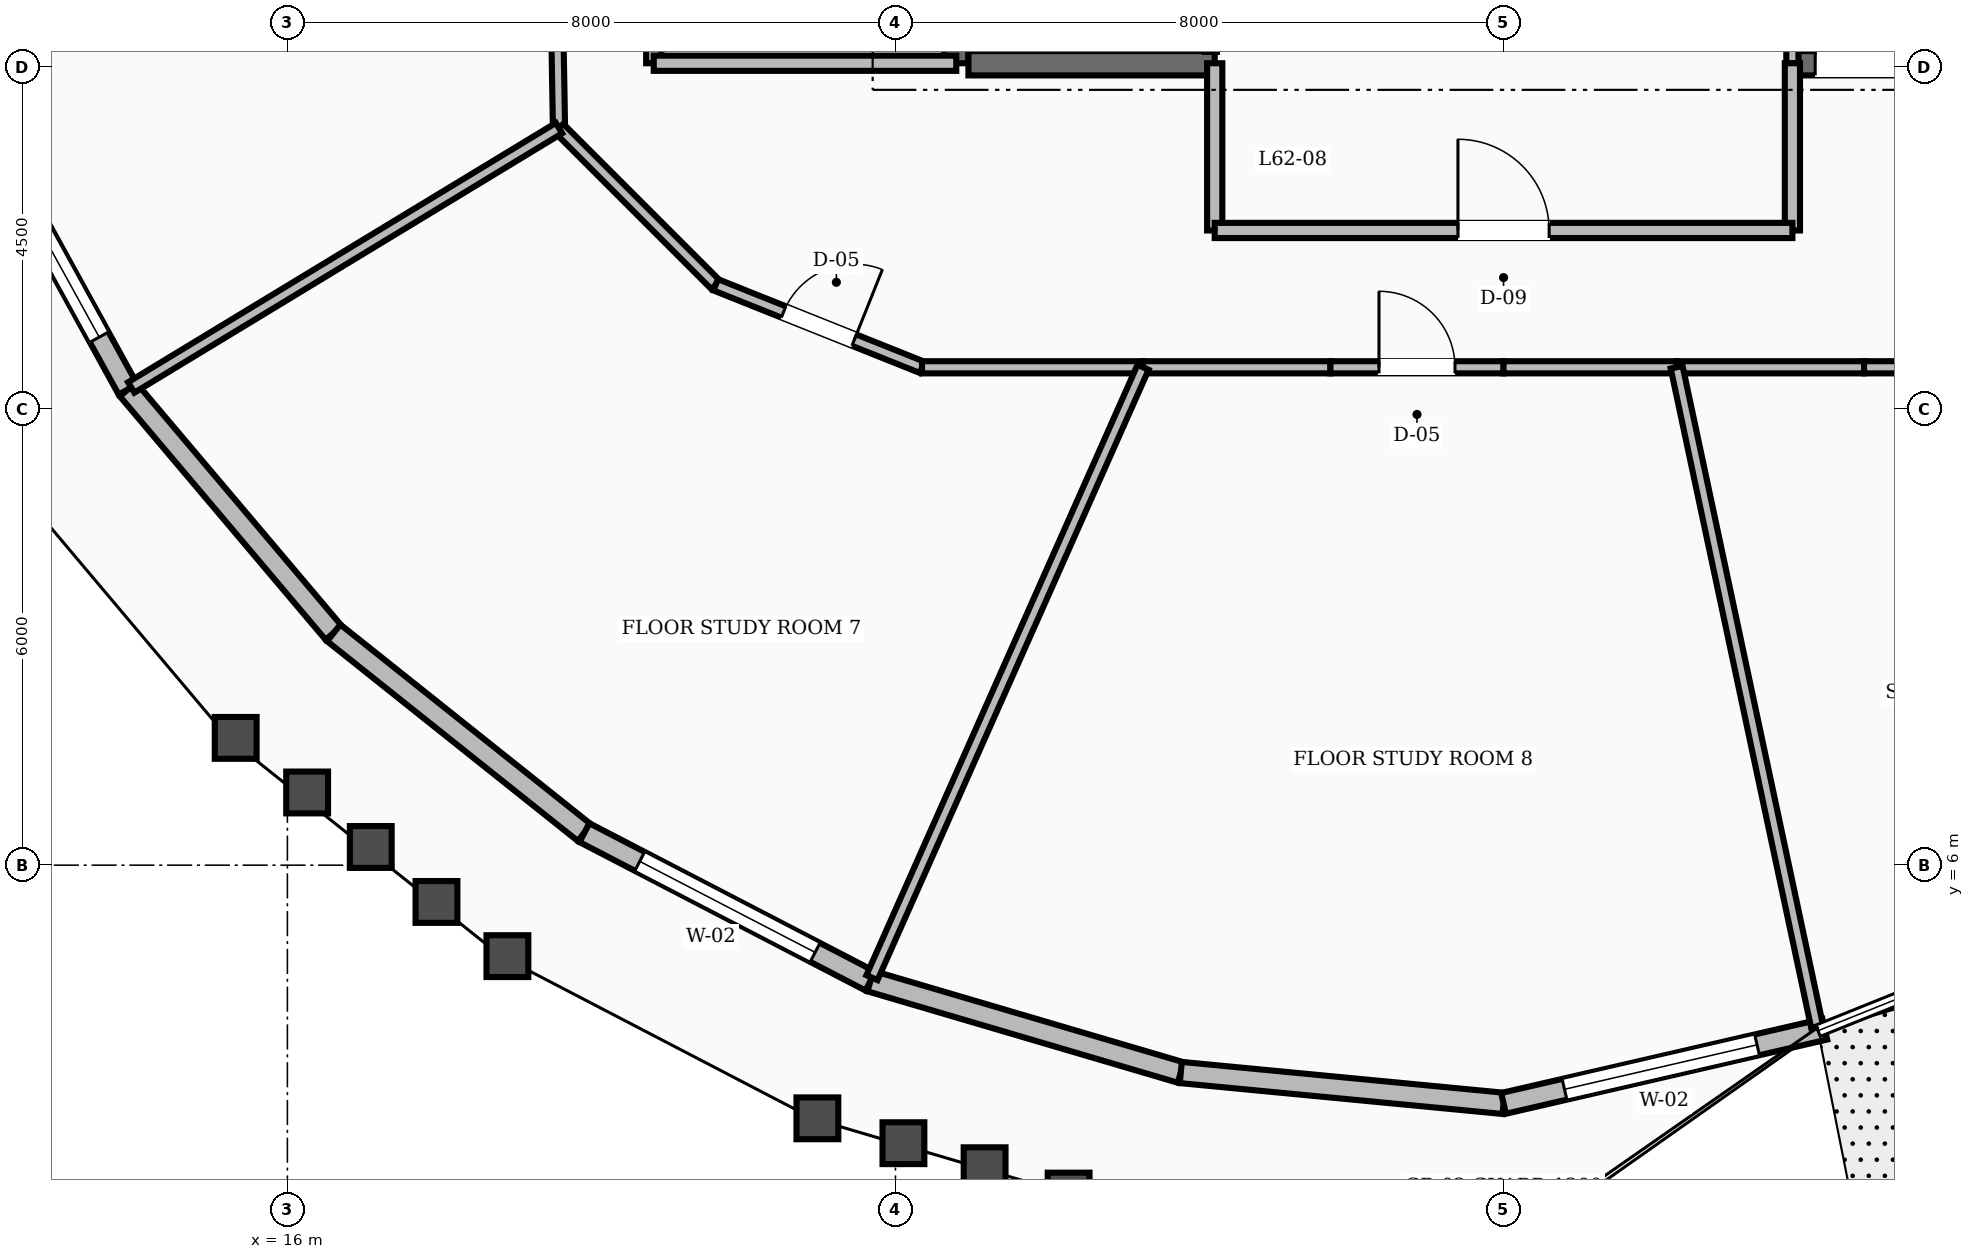
"""IFC4 building model, lengths in metres.
Left out: names, types, materials, properties, quantities, classifications, styles, units other than length and angle.
Written with IfcOpenShell. Run it as: python <this file> out.ifc"""

import sys

from ifc_helpers import new_model, si_unit, direction, frame, frame_2d, origin, place, context, subcontext, project, spatial, rectangle, extrude, element, fill, save


model = new_model("IFC4")
c1 = context("Model", 3, precision=1e-05, world=origin(), true_north=direction((0.0, 1.0)))
c2 = subcontext(c1, "Body", "Model", "MODEL_VIEW")
j1 = project(units=[si_unit("LENGTHUNIT", "METRE"), si_unit("PLANEANGLEUNIT", "RADIAN")], contexts=[c1])
p1 = place(None, origin())
s1 = spatial("IfcSite", under=j1, at=p1, CompositionType="ELEMENT")
p2 = place(p1, origin())
s2 = spatial("IfcBuilding", under=s1, at=p2, CompositionType="ELEMENT")
p3 = place(p2, frame((0.0, 0.0, 240.0)))
s3 = spatial("IfcBuildingStorey", under=s2, at=p3, CompositionType="ELEMENT", Elevation=240.0)
p4 = place(p3, frame((24.8, 16.55, 0.0), z_axis=(0.0, 0.0, 1.0), x_axis=(0.0, 1.0, 0.0)))
e1 = element("IfcWall", 1, at=p4, inside=s3, PredefinedType="SHEAR", context=c2, shape_type="SweptSolid", body=[
    extrude(rectangle(XDim=6.3, YDim=0.32, at=frame_2d((3.15, 0.0))), origin(), (0.0, 0.0, 1.0), 3.6),
])
p5 = place(p3, frame((24.96, 16.55, 0.0), z_axis=(0.0, 0.0, 1.0), x_axis=(1.0, 0.0, 0.0)))
e2 = element("IfcWall", 2, at=p5, inside=s3, PredefinedType="SHEAR", context=c2, shape_type="SweptSolid", body=[
    extrude(rectangle(XDim=3.24, YDim=0.32, at=frame_2d((1.62, 0.0))), origin(), (0.0, 0.0, 1.0), 3.6),
])
p6 = place(p3, frame((35.8, 16.55, 0.0), z_axis=(0.0, 0.0, 1.0), x_axis=(1.0, 0.0, 0.0)))
e3 = element("IfcWall", 3, at=p6, inside=s3, PredefinedType="SHEAR", context=c2, shape_type="SweptSolid", body=[
    extrude(rectangle(XDim=3.24, YDim=0.32, at=frame_2d((1.62, 0.0))), origin(), (0.0, 0.0, 1.0), 3.6),
])
p7 = place(p6, frame((0.3, 0.0, 0.0)))
e4 = element("IfcOpeningElement", 4, at=p7, cuts=e3, PredefinedType="OPENING", context=c2, shape_type="SweptSolid", body=[
    extrude(rectangle(XDim=1.1, YDim=2.1, at=frame_2d((0.55, 1.05))), frame((0.0, 0.17, 0.0), z_axis=(0.0, -1.0, 0.0), x_axis=(1.0, 0.0, 0.0)), (0.0, 0.0, 1.0), 0.34),
])
p8 = place(p3, frame((11.891, 15.912, 0.0), z_axis=(0.0, 0.0, 1.0), x_axis=(0.482219827967, -0.876050248282, 0.0)))
e5 = element("IfcWall", 5, at=p8, inside=s3, PredefinedType="STANDARD", context=c2, shape_type="SweptSolid", body=[
    extrude(rectangle(XDim=4.171, YDim=0.28, at=frame_2d((2.085, 0.0))), origin(), (0.0, 0.0, 1.0), 2.88),
])
p9 = place(p8, frame((0.785, 0.0, 0.8)))
e6 = element("IfcOpeningElement", 6, at=p9, cuts=e5, PredefinedType="OPENING", context=c2, shape_type="SweptSolid", body=[
    extrude(rectangle(XDim=2.6, YDim=1.65, at=frame_2d((1.3, 0.825))), frame((0.0, 0.15, 0.0), z_axis=(0.0, -1.0, 0.0), x_axis=(1.0, 0.0, 0.0)), (0.0, 0.0, 1.0), 0.3),
])
p10 = place(p3, frame((13.903, 12.259, 0.0), z_axis=(0.0, 0.0, 1.0), x_axis=(0.645568939202, -0.763701999956, 0.0)))
e7 = element("IfcWall", 7, at=p10, inside=s3, PredefinedType="STANDARD", context=c2, shape_type="SweptSolid", body=[
    extrude(rectangle(XDim=4.193, YDim=0.28, at=frame_2d((2.097, 0.0))), origin(), (0.0, 0.0, 1.0), 2.88),
])
p11 = place(p3, frame((16.61, 9.056, 0.0), z_axis=(0.0, 0.0, 1.0), x_axis=(0.782030895384, -0.623239663906, 0.0)))
e8 = element("IfcWall", 8, at=p11, inside=s3, PredefinedType="STANDARD", context=c2, shape_type="SweptSolid", body=[
    extrude(rectangle(XDim=4.217, YDim=0.28, at=frame_2d((2.109, 0.0))), origin(), (0.0, 0.0, 1.0), 2.88),
])
p12 = place(p3, frame((19.908, 6.428, 0.0), z_axis=(0.0, 0.0, 1.0), x_axis=(0.887588000353, -0.460638189504, 0.0)))
e9 = element("IfcWall", 9, at=p12, inside=s3, PredefinedType="STANDARD", context=c2, shape_type="SweptSolid", body=[
    extrude(rectangle(XDim=4.24, YDim=0.28, at=frame_2d((2.12, 0.0))), origin(), (0.0, 0.0, 1.0), 2.88),
])
p13 = place(p12, frame((0.82, 0.0, 0.8)))
e10 = element("IfcOpeningElement", 10, at=p13, cuts=e9, PredefinedType="OPENING", context=c2, shape_type="SweptSolid", body=[
    extrude(rectangle(XDim=2.6, YDim=1.65, at=frame_2d((1.3, 0.825))), frame((0.0, 0.15, 0.0), z_axis=(0.0, -1.0, 0.0), x_axis=(1.0, 0.0, 0.0)), (0.0, 0.0, 1.0), 0.3),
])
p14 = place(p3, frame((23.671, 4.475, 0.0), z_axis=(0.0, 0.0, 1.0), x_axis=(0.95925857755, -0.28252961154, 0.0)))
e11 = element("IfcWall", 11, at=p14, inside=s3, PredefinedType="STANDARD", context=c2, shape_type="SweptSolid", body=[
    extrude(rectangle(XDim=4.257, YDim=0.28, at=frame_2d((2.128, 0.0))), origin(), (0.0, 0.0, 1.0), 2.88),
])
p15 = place(p3, frame((27.754, 3.272, 0.0), z_axis=(0.0, 0.0, 1.0), x_axis=(0.995459644973, -0.09518453252, 0.0)))
e12 = element("IfcWall", 12, at=p15, inside=s3, PredefinedType="STANDARD", context=c2, shape_type="SweptSolid", body=[
    extrude(rectangle(XDim=4.265, YDim=0.28, at=frame_2d((2.133, 0.0))), origin(), (0.0, 0.0, 1.0), 2.88),
])
p16 = place(p3, frame((32.0, 2.866, 0.0), z_axis=(0.0, 0.0, 1.0), x_axis=(0.974367475621, 0.22496226895, 0.0)))
e13 = element("IfcWall", 13, at=p16, inside=s3, PredefinedType="STANDARD", context=c2, shape_type="SweptSolid", body=[
    extrude(rectangle(XDim=4.338, YDim=0.28, at=frame_2d((2.169, 0.0))), origin(), (0.0, 0.0, 1.0), 2.88),
])
p17 = place(p16, frame((0.823, 0.0, 0.8)))
e14 = element("IfcOpeningElement", 14, at=p17, cuts=e13, PredefinedType="OPENING", context=c2, shape_type="SweptSolid", body=[
    extrude(rectangle(XDim=2.6, YDim=1.65, at=frame_2d((1.3, 0.825))), frame((0.0, 0.15, 0.0), z_axis=(0.0, -1.0, 0.0), x_axis=(1.0, 0.0, 0.0)), (0.0, 0.0, 1.0), 0.3),
])
p18 = place(p3, frame((20.82, 16.55, 0.0), z_axis=(0.0, 0.0, 1.0), x_axis=(0.0, 1.0, 0.0)))
e15 = element("IfcWall", 15, at=p18, inside=s3, PredefinedType="SOLIDWALL", context=c2, shape_type="SweptSolid", body=[
    extrude(rectangle(XDim=2.73, YDim=0.2, at=frame_2d((1.365, 0.0))), origin(), (0.0, 0.0, 1.0), 2.87),
])
p19 = place(p18, frame((0.815, 0.0, 0.0)))
e16 = element("IfcOpeningElement", 16, at=p19, cuts=e15, PredefinedType="OPENING", context=c2, shape_type="SweptSolid", body=[
    extrude(rectangle(XDim=1.1, YDim=2.1, at=frame_2d((0.55, 1.05))), frame((0.0, 0.11, 0.0), z_axis=(0.0, -1.0, 0.0), x_axis=(1.0, 0.0, 0.0)), (0.0, 0.0, 1.0), 0.22),
])
p20 = place(p3, frame((20.82, 16.55, 0.0), z_axis=(0.0, 0.0, 1.0), x_axis=(1.0, 0.0, 0.0)))
e17 = element("IfcWall", 17, at=p20, inside=s3, PredefinedType="SOLIDWALL", context=c2, shape_type="SweptSolid", body=[
    extrude(rectangle(XDim=3.98, YDim=0.2, at=frame_2d((1.99, 0.0))), origin(), (0.0, 0.0, 1.0), 2.87),
])
p21 = place(p3, frame((35.8, 16.55, 0.0), z_axis=(0.0, 0.0, 1.0), x_axis=(0.0, 1.0, 0.0)))
e18 = element("IfcWall", 18, at=p21, inside=s3, PredefinedType="SOLIDWALL", context=c2, shape_type="SweptSolid", body=[
    extrude(rectangle(XDim=3.3, YDim=0.16, at=frame_2d((1.65, 0.0))), origin(), (0.0, 0.0, 1.0), 2.87),
])
for number, where, z_axis, x_axis in (
    (19, (28.2, 14.35, 0.0), (0.0, 0.0, 1.0), (0.0, 1.0, 0.0)),
    (20, (35.8, 14.35, 0.0), (0.0, 0.0, 1.0), (0.0, 1.0, 0.0)),
):
    element("IfcWall", number, at=place(p3, frame(where, z_axis=z_axis, x_axis=x_axis)), inside=s3, PredefinedType="SOLIDWALL", context=c2, shape_type="SweptSolid", body=[
        extrude(rectangle(XDim=2.2, YDim=0.2, at=frame_2d((1.1, 0.0))), origin(), (0.0, 0.0, 1.0), 2.87),
    ])
p22 = place(p3, frame((28.2, 14.35, 0.0), z_axis=(0.0, 0.0, 1.0), x_axis=(1.0, 0.0, 0.0)))
e21 = element("IfcWall", 21, at=p22, inside=s3, PredefinedType="SOLIDWALL", context=c2, shape_type="SweptSolid", body=[
    extrude(rectangle(XDim=7.6, YDim=0.2, at=frame_2d((3.8, 0.0))), origin(), (0.0, 0.0, 1.0), 2.87),
])
p23 = place(p22, frame((3.2, 0.0, 0.0)))
e22 = element("IfcOpeningElement", 22, at=p23, cuts=e21, PredefinedType="OPENING", context=c2, shape_type="SweptSolid", body=[
    extrude(rectangle(XDim=1.2, YDim=2.1, at=frame_2d((0.6, 1.05))), frame((0.0, 0.11, 0.0), z_axis=(0.0, -1.0, 0.0), x_axis=(1.0, 0.0, 0.0)), (0.0, 0.0, 1.0), 0.22),
])
p24 = place(p3, frame((19.52, 18.831, 0.0), z_axis=(0.0, 0.0, 1.0), x_axis=(0.016981035134, -0.999855811828, 0.0)))
e23 = element("IfcWall", 23, at=p24, inside=s3, PredefinedType="SOLIDWALL", context=c2, shape_type="SweptSolid", body=[
    extrude(rectangle(XDim=3.134, YDim=0.16, at=frame_2d((1.567, 0.0))), origin(), (0.0, 0.0, 1.0), 2.87),
])
p25 = place(p3, frame((19.573, 15.697, 0.0), z_axis=(0.0, 0.0, 1.0), x_axis=(0.707106781187, -0.707106781187, 0.0)))
e24 = element("IfcWall", 24, at=p25, inside=s3, PredefinedType="SOLIDWALL", context=c2, shape_type="SweptSolid", body=[
    extrude(rectangle(XDim=2.916, YDim=0.16, at=frame_2d((1.458, 0.0))), origin(), (0.0, 0.0, 1.0), 2.87),
])
p26 = place(p3, frame((21.635, 13.635, 0.0), z_axis=(0.0, 0.0, 1.0), x_axis=(0.92856882165, -0.371160266542, 0.0)))
e25 = element("IfcWall", 25, at=p26, inside=s3, PredefinedType="SOLIDWALL", context=c2, shape_type="SweptSolid", body=[
    extrude(rectangle(XDim=2.923, YDim=0.16, at=frame_2d((1.461, 0.0))), origin(), (0.0, 0.0, 1.0), 2.87),
])
p27 = place(p26, frame((0.962, 0.0, 0.0)))
e26 = element("IfcOpeningElement", 26, at=p27, cuts=e25, PredefinedType="OPENING", context=c2, shape_type="SweptSolid", body=[
    extrude(rectangle(XDim=1.0, YDim=2.1, at=frame_2d((0.5, 1.05))), frame((0.0, 0.09, 0.0), z_axis=(0.0, -1.0, 0.0), x_axis=(1.0, 0.0, 0.0)), (0.0, 0.0, 1.0), 0.18),
])
p28 = place(p3, frame((24.349, 12.55, 0.0), z_axis=(0.0, 0.0, 1.0), x_axis=(1.0, 0.0, 0.0)))
e27 = element("IfcWall", 27, at=p28, inside=s3, PredefinedType="SOLIDWALL", context=c2, shape_type="SweptSolid", body=[
    extrude(rectangle(XDim=2.908, YDim=0.16, at=frame_2d((1.454, 0.0))), origin(), (0.0, 0.0, 1.0), 2.87),
])
p29 = place(p3, frame((27.257, 12.55, 0.0), z_axis=(0.0, 0.0, 1.0), x_axis=(1.0, 0.0, 0.0)))
e28 = element("IfcWall", 28, at=p29, inside=s3, PredefinedType="SOLIDWALL", context=c2, shape_type="SweptSolid", body=[
    extrude(rectangle(XDim=2.465, YDim=0.16, at=frame_2d((1.232, 0.0))), origin(), (0.0, 0.0, 1.0), 2.87),
])
p30 = place(p3, frame((29.722, 12.55, 0.0), z_axis=(0.0, 0.0, 1.0), x_axis=(1.0, 0.0, 0.0)))
e29 = element("IfcWall", 29, at=p30, inside=s3, PredefinedType="SOLIDWALL", context=c2, shape_type="SweptSolid", body=[
    extrude(rectangle(XDim=2.278, YDim=0.16, at=frame_2d((1.139, 0.0))), origin(), (0.0, 0.0, 1.0), 2.87),
])
p31 = place(p30, frame((0.639, 0.0, 0.0)))
e30 = element("IfcOpeningElement", 30, at=p31, cuts=e29, PredefinedType="OPENING", context=c2, shape_type="SweptSolid", body=[
    extrude(rectangle(XDim=1.0, YDim=2.1, at=frame_2d((0.5, 1.05))), frame((0.0, 0.09, 0.0), z_axis=(0.0, -1.0, 0.0), x_axis=(1.0, 0.0, 0.0)), (0.0, 0.0, 1.0), 0.18),
])
p32 = place(p3, frame((32.0, 12.55, 0.0), z_axis=(0.0, 0.0, 1.0), x_axis=(1.0, 0.0, 0.0)))
e31 = element("IfcWall", 31, at=p32, inside=s3, PredefinedType="SOLIDWALL", context=c2, shape_type="SweptSolid", body=[
    extrude(rectangle(XDim=2.278, YDim=0.16, at=frame_2d((1.139, 0.0))), origin(), (0.0, 0.0, 1.0), 2.87),
])
p33 = place(p3, frame((34.278, 12.55, 0.0), z_axis=(0.0, 0.0, 1.0), x_axis=(1.0, 0.0, 0.0)))
e32 = element("IfcWall", 32, at=p33, inside=s3, PredefinedType="SOLIDWALL", context=c2, shape_type="SweptSolid", body=[
    extrude(rectangle(XDim=2.465, YDim=0.16, at=frame_2d((1.232, 0.0))), origin(), (0.0, 0.0, 1.0), 2.87),
])
p34 = place(p3, frame((36.743, 12.55, 0.0), z_axis=(0.0, 0.0, 1.0), x_axis=(1.0, 0.0, 0.0)))
e33 = element("IfcWall", 33, at=p34, inside=s3, PredefinedType="SOLIDWALL", context=c2, shape_type="SweptSolid", body=[
    extrude(rectangle(XDim=2.908, YDim=0.16, at=frame_2d((1.454, 0.0))), origin(), (0.0, 0.0, 1.0), 2.87),
])
p35 = place(p34, frame((0.954, 0.0, 0.0)))
e34 = element("IfcOpeningElement", 34, at=p35, cuts=e33, PredefinedType="OPENING", context=c2, shape_type="SweptSolid", body=[
    extrude(rectangle(XDim=1.0, YDim=2.1, at=frame_2d((0.5, 1.05))), frame((0.0, 0.09, 0.0), z_axis=(0.0, -1.0, 0.0), x_axis=(1.0, 0.0, 0.0)), (0.0, 0.0, 1.0), 0.18),
])
p36 = place(p3, frame((19.573, 15.697, 0.0), z_axis=(0.0, 0.0, 1.0), x_axis=(-0.855087696753, -0.518483394973, 0.0)))
e35 = element("IfcWall", 35, at=p36, inside=s3, PredefinedType="SOLIDWALL", context=c2, shape_type="SweptSolid", body=[
    extrude(rectangle(XDim=6.581, YDim=0.16, at=frame_2d((3.291, 0.0))), origin(), (0.0, 0.0, 1.0), 2.87),
])
p37 = place(p3, frame((27.257, 12.55, 0.0), z_axis=(0.0, 0.0, 1.0), x_axis=(-0.405921882918, -0.913907777059, 0.0)))
e36 = element("IfcWall", 36, at=p37, inside=s3, PredefinedType="SOLIDWALL", context=c2, shape_type="SweptSolid", body=[
    extrude(rectangle(XDim=8.786, YDim=0.16, at=frame_2d((4.393, 0.0))), origin(), (0.0, 0.0, 1.0), 2.87),
])
p38 = place(p3, frame((34.278, 12.55, 0.0), z_axis=(0.0, 0.0, 1.0), x_axis=(0.208364107571, -0.97805132722, 0.0)))
e37 = element("IfcWall", 37, at=p38, inside=s3, PredefinedType="SOLIDWALL", context=c2, shape_type="SweptSolid", body=[
    extrude(rectangle(XDim=8.875, YDim=0.16, at=frame_2d((4.437, 0.0))), origin(), (0.0, 0.0, 1.0), 2.87),
])
p39 = place(p9, origin())
e38 = element("IfcWindow", 38, at=p39, inside=s3, PartitioningType="SINGLE_PANEL", PredefinedType="WINDOW", context=c2, shape_type="SweptSolid", body=[
    extrude(rectangle(XDim=2.6, YDim=1.65, at=frame_2d((1.3, 0.825))), frame((0.0, 0.03, 0.0), z_axis=(0.0, -1.0, 0.0), x_axis=(1.0, 0.0, 0.0)), (0.0, 0.0, 1.0), 0.06),
])
fill(e6, e38)
p40 = place(p13, origin())
e39 = element("IfcWindow", 39, at=p40, inside=s3, PartitioningType="SINGLE_PANEL", PredefinedType="WINDOW", context=c2, shape_type="SweptSolid", body=[
    extrude(rectangle(XDim=2.6, YDim=1.65, at=frame_2d((1.3, 0.825))), frame((0.0, 0.03, 0.0), z_axis=(0.0, -1.0, 0.0), x_axis=(1.0, 0.0, 0.0)), (0.0, 0.0, 1.0), 0.06),
])
fill(e10, e39)
p41 = place(p17, origin())
e40 = element("IfcWindow", 40, at=p41, inside=s3, PartitioningType="SINGLE_PANEL", PredefinedType="WINDOW", context=c2, shape_type="SweptSolid", body=[
    extrude(rectangle(XDim=2.6, YDim=1.65, at=frame_2d((1.3, 0.825))), frame((0.0, 0.03, 0.0), z_axis=(0.0, -1.0, 0.0), x_axis=(1.0, 0.0, 0.0)), (0.0, 0.0, 1.0), 0.06),
])
fill(e14, e40)
p42 = place(p7, origin())
e41 = element("IfcDoor", 41, at=p42, inside=s3, OperationType="SINGLE_SWING_RIGHT", PredefinedType="DOOR", context=c2, shape_type="SweptSolid", body=[
    extrude(rectangle(XDim=1.1, YDim=2.1, at=frame_2d((0.55, 1.05))), frame((0.0, 0.025, 0.0), z_axis=(0.0, -1.0, 0.0), x_axis=(1.0, 0.0, 0.0)), (0.0, 0.0, 1.0), 0.05),
])
fill(e4, e41)
p43 = place(p23, origin())
e42 = element("IfcDoor", 42, at=p43, inside=s3, OperationType="SINGLE_SWING_LEFT", PredefinedType="DOOR", context=c2, shape_type="SweptSolid", body=[
    extrude(rectangle(XDim=1.2, YDim=2.1, at=frame_2d((0.6, 1.05))), frame((0.0, 0.025, 0.0), z_axis=(0.0, -1.0, 0.0), x_axis=(1.0, 0.0, 0.0)), (0.0, 0.0, 1.0), 0.05),
])
fill(e22, e42)
p44 = place(p27, origin())
e43 = element("IfcDoor", 43, at=p44, inside=s3, OperationType="SINGLE_SWING_RIGHT", PredefinedType="DOOR", context=c2, shape_type="SweptSolid", body=[
    extrude(rectangle(XDim=1.0, YDim=2.1, at=frame_2d((0.5, 1.05))), frame((0.0, 0.025, 0.0), z_axis=(0.0, -1.0, 0.0), x_axis=(1.0, 0.0, 0.0)), (0.0, 0.0, 1.0), 0.05),
])
fill(e26, e43)
p45 = place(p31, origin())
e44 = element("IfcDoor", 44, at=p45, inside=s3, OperationType="SINGLE_SWING_LEFT", PredefinedType="DOOR", context=c2, shape_type="SweptSolid", body=[
    extrude(rectangle(XDim=1.0, YDim=2.1, at=frame_2d((0.5, 1.05))), frame((0.0, 0.025, 0.0), z_axis=(0.0, -1.0, 0.0), x_axis=(1.0, 0.0, 0.0)), (0.0, 0.0, 1.0), 0.05),
])
fill(e30, e44)
save(model, sys.argv[1])
